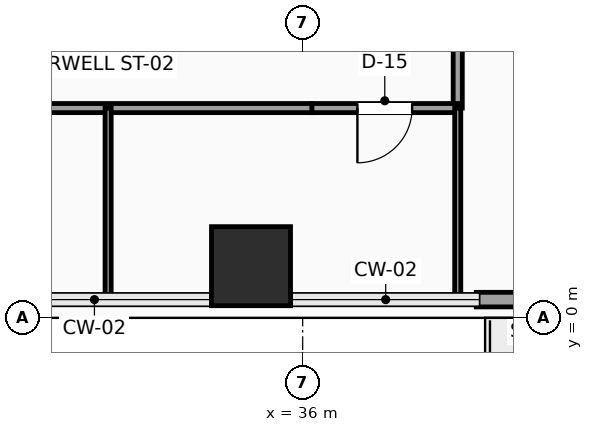
"""IFC4 building model, lengths in metres.
Left out: names, types, materials, properties, quantities, classifications, styles, units other than length and angle.
Written with IfcOpenShell. Run it as: python <this file> out.ifc"""

import sys

from ifc_helpers import new_model, si_unit, direction, frame, frame_2d, origin, origin_2d, place, context, subcontext, project, spatial, rectangle, extrude, element, fill, save


model = new_model("IFC4")
c1 = context("Model", 3, precision=1e-05, world=origin(), true_north=direction((0.0, 1.0)))
c2 = subcontext(c1, "Body", "Model", "MODEL_VIEW")
j1 = project(units=[si_unit("LENGTHUNIT", "METRE"), si_unit("PLANEANGLEUNIT", "RADIAN")], contexts=[c1])
p1 = place(None, origin())
s1 = spatial("IfcSite", under=j1, at=p1, CompositionType="ELEMENT")
p2 = place(p1, origin())
s2 = spatial("IfcBuilding", under=s1, at=p2, CompositionType="ELEMENT")
p3 = place(p2, frame((0.0, 0.0, 40.2)))
s3 = spatial("IfcBuildingStorey", under=s2, at=p3, CompositionType="ELEMENT", Elevation=40.2)
p4 = place(p3, frame((35.15, 0.85, 0.0), z_axis=(0.0, 0.0, 1.0), x_axis=(1.0, 0.0, 0.0)))
e1 = element("IfcColumn", 1, at=p4, inside=s3, PredefinedType="COLUMN", context=c2, shape_type="SweptSolid", body=[
    extrude(rectangle(XDim=1.3, YDim=1.3, at=origin_2d()), origin(), (0.0, 0.0, 1.0), 3.9),
])
p5 = place(p3, frame((48.145, 0.3, 0.0), z_axis=(0.0, 0.0, 1.0), x_axis=(-1.0, 0.0, 0.0)))
e2 = element("IfcWall", 2, at=p5, inside=s3, PredefinedType="SOLIDWALL", context=c2, shape_type="SweptSolid", body=[
    extrude(rectangle(XDim=9.29, YDim=0.24, at=frame_2d((4.645, 0.0))), origin(), (0.0, 0.0, 1.0), 3.65),
])
p6 = place(p5, frame((4.7, 0.0, 0.0)))
e3 = element("IfcOpeningElement", 3, at=p6, cuts=e2, PredefinedType="OPENING", context=c2, shape_type="SweptSolid", body=[
    extrude(rectangle(XDim=1.05, YDim=2.2, at=frame_2d((0.525, 1.1))), frame((0.0, 0.13, 0.0), z_axis=(0.0, -1.0, 0.0), x_axis=(1.0, 0.0, 0.0)), (0.0, 0.0, 1.0), 0.26),
])
p7 = place(p3, frame((38.55, 5.8, 0.0), z_axis=(0.0, 0.0, 1.0), x_axis=(0.0, -1.0, 0.0)))
e4 = element("IfcWall", 4, at=p7, inside=s3, PredefinedType="PARTITIONING", context=c2, shape_type="SweptSolid", body=[
    extrude(rectangle(XDim=2.35, YDim=0.15, at=frame_2d((1.175, 0.0))), origin(), (0.0, 0.0, 1.0), 3.65),
])
p8 = place(p3, frame((38.55, 3.45, 0.0), z_axis=(0.0, 0.0, 1.0), x_axis=(-1.0, 0.0, 0.0)))
e5 = element("IfcWall", 5, at=p8, inside=s3, PredefinedType="PARTITIONING", context=c2, shape_type="SweptSolid", body=[
    extrude(rectangle(XDim=2.4, YDim=0.15, at=frame_2d((1.2, 0.0))), origin(), (0.0, 0.0, 1.0), 3.142),
])
p9 = place(p8, frame((0.75, 0.0, 0.0)))
e6 = element("IfcOpeningElement", 6, at=p9, cuts=e5, PredefinedType="OPENING", context=c2, shape_type="SweptSolid", body=[
    extrude(rectangle(XDim=0.9, YDim=2.1, at=frame_2d((0.45, 1.05))), frame((0.0, 0.085, 0.0), z_axis=(0.0, -1.0, 0.0), x_axis=(1.0, 0.0, 0.0)), (0.0, 0.0, 1.0), 0.17),
])
p10 = place(p3, frame((36.15, 3.45, 0.0), z_axis=(0.0, 0.0, 1.0), x_axis=(-1.0, 0.0, 0.0)))
e7 = element("IfcWall", 7, at=p10, inside=s3, PredefinedType="PARTITIONING", context=c2, shape_type="SweptSolid", body=[
    extrude(rectangle(XDim=14.6, YDim=0.15, at=frame_2d((7.3, 0.0))), origin(), (0.0, 0.0, 1.0), 3.142),
])
p11 = place(p10, frame((11.325, 0.0, 0.0)))
e8 = element("IfcOpeningElement", 8, at=p11, cuts=e7, PredefinedType="OPENING", context=c2, shape_type="SweptSolid", body=[
    extrude(rectangle(XDim=0.9, YDim=2.1, at=frame_2d((0.45, 1.05))), frame((0.0, 0.085, 0.0), z_axis=(0.0, -1.0, 0.0), x_axis=(1.0, 0.0, 0.0)), (0.0, 0.0, 1.0), 0.17),
])
p12 = place(p10, frame((5.7, 0.0, 0.0)))
e9 = element("IfcOpeningElement", 9, at=p12, cuts=e7, PredefinedType="OPENING", context=c2, shape_type="SweptSolid", body=[
    extrude(rectangle(XDim=0.9, YDim=2.1, at=frame_2d((0.45, 1.05))), frame((0.0, 0.085, 0.0), z_axis=(0.0, -1.0, 0.0), x_axis=(1.0, 0.0, 0.0)), (0.0, 0.0, 1.0), 0.17),
])
for number, where, z_axis, x_axis in (
    (10, (32.8, 0.3, 0.0), (0.0, 0.0, 1.0), (0.0, 1.0, 0.0)),
    (11, (38.55, 0.3, 0.0), (0.0, 0.0, 1.0), (0.0, 1.0, 0.0)),
):
    element("IfcWall", number, at=place(p3, frame(where, z_axis=z_axis, x_axis=x_axis)), inside=s3, PredefinedType="PARTITIONING", context=c2, shape_type="SweptSolid", body=[
        extrude(rectangle(XDim=3.15, YDim=0.1, at=frame_2d((1.575, 0.0))), origin(), (0.0, 0.0, 1.0), 3.65),
    ])
p13 = place(p9, origin())
e12 = element("IfcDoor", 12, at=p13, inside=s3, OperationType="SINGLE_SWING_RIGHT", PredefinedType="DOOR", context=c2, shape_type="SweptSolid", body=[
    extrude(rectangle(XDim=0.9, YDim=2.1, at=frame_2d((0.45, 1.05))), frame((0.0, 0.025, 0.0), z_axis=(0.0, -1.0, 0.0), x_axis=(1.0, 0.0, 0.0)), (0.0, 0.0, 1.0), 0.05),
])
fill(e6, e12)
save(model, sys.argv[1])
